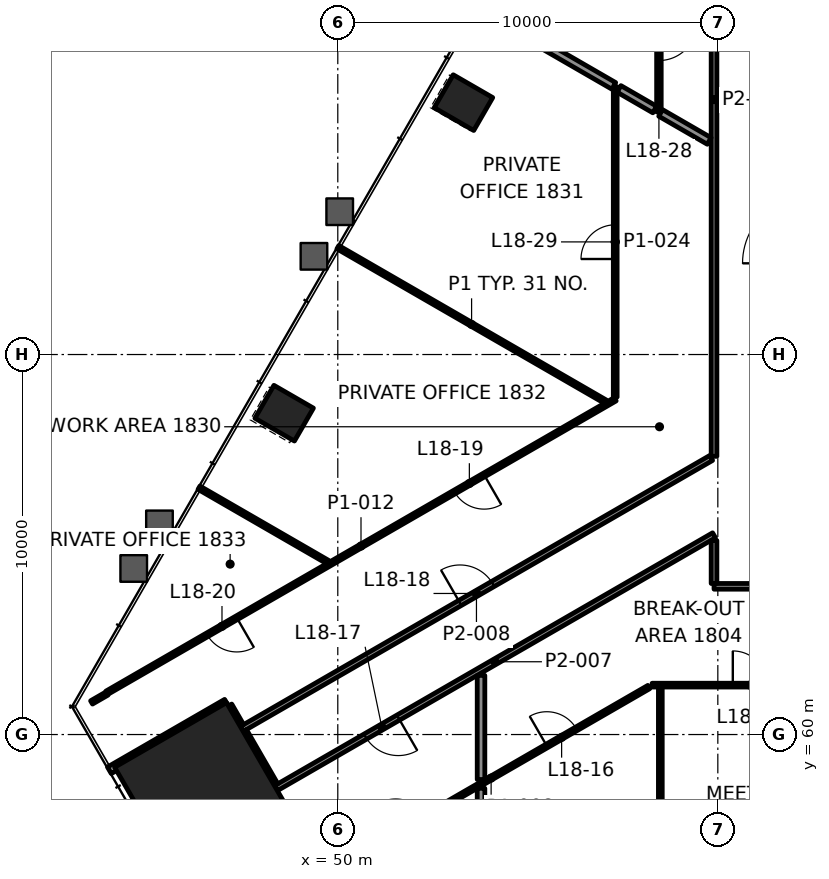
"""IFC4 building model, lengths in metres.
Left out: names, types, materials, properties, quantities, classifications, styles, units other than length and angle.
Written with IfcOpenShell. Run it as: python <this file> out.ifc"""

import sys

from ifc_helpers import new_model, si_unit, direction, frame, frame_2d, origin, origin_2d, place, context, subcontext, project, spatial, rectangle, extrude, element, fill, save


model = new_model("IFC4")
c1 = context("Model", 3, precision=1e-05, world=origin(), true_north=direction((0.0, 1.0)))
c2 = subcontext(c1, "Body", "Model", "MODEL_VIEW")
j1 = project(units=[si_unit("LENGTHUNIT", "METRE"), si_unit("PLANEANGLEUNIT", "RADIAN")], contexts=[c1])
p1 = place(None, origin())
s1 = spatial("IfcSite", under=j1, at=p1, CompositionType="ELEMENT")
p2 = place(p1, origin())
s2 = spatial("IfcBuilding", under=s1, at=p2, CompositionType="ELEMENT")
p3 = place(p2, frame((0.0, 0.0, 82.0)))
s3 = spatial("IfcBuildingStorey", under=s2, at=p3, CompositionType="ELEMENT", Elevation=82.0)
p4 = place(p3, frame((46.45, 58.517, 0.0), z_axis=(0.0, 0.0, 1.0), x_axis=(0.5, -0.866025403784, 0.0)))
e1 = element("IfcColumn", 1, at=p4, inside=s3, PredefinedType="COLUMN", context=c2, shape_type="SweptSolid", body=[
    extrude(rectangle(XDim=3.4, YDim=3.4, at=origin_2d()), origin(), (0.0, 0.0, 1.0), 4.2),
])
for number, where, z_axis, x_axis in (
    (2, (53.307, 76.628, -0.0), (0.0, 0.0, 1.0), (-0.5, -0.866, 0.0)),
    (3, (48.589, 68.457, -0.0), (0.0, 0.0, 1.0), (-0.5, -0.866, 0.0)),
):
    element("IfcColumn", number, at=place(p3, frame(where, z_axis=z_axis, x_axis=x_axis)), inside=s3, PredefinedType="COLUMN", context=c2, shape_type="SweptSolid", body=[
        extrude(rectangle(XDim=1.0, YDim=1.2, at=origin_2d()), origin(), (0.0, 0.0, 1.0), 4.2),
    ])
p5 = place(p3, frame((58.271, 61.3, 0.0), z_axis=(0.0, 0.0, 1.0), x_axis=(1.0, 0.0, 0.0)))
e4 = element("IfcWall", 4, at=p5, inside=s3, PredefinedType="PARTITIONING", context=c2, shape_type="SweptSolid", body=[
    extrude(rectangle(XDim=14.37, YDim=0.1, at=frame_2d((7.185, 0.0))), origin(), (0.0, 0.0, 1.0), 3.4),
])
p6 = place(p5, frame((2.123, 0.0, 0.0)))
e5 = element("IfcOpeningElement", 5, at=p6, cuts=e4, PredefinedType="OPENING", context=c2, shape_type="SweptSolid", body=[
    extrude(rectangle(XDim=0.9, YDim=2.1, at=frame_2d((0.45, 1.05))), frame((0.0, 0.06, 0.0), z_axis=(0.0, -1.0, 0.0), x_axis=(1.0, 0.0, 0.0)), (0.0, 0.0, 1.0), 0.12),
])
p7 = place(p5, frame((9.052, 0.0, 0.0)))
e6 = element("IfcOpeningElement", 6, at=p7, cuts=e4, PredefinedType="OPENING", context=c2, shape_type="SweptSolid", body=[
    extrude(rectangle(XDim=1.0, YDim=2.1, at=frame_2d((0.5, 1.05))), frame((0.0, 0.06, 0.0), z_axis=(0.0, -1.0, 0.0), x_axis=(1.0, 0.0, 0.0)), (0.0, 0.0, 1.0), 0.12),
])
p8 = place(p3, frame((90.1, 63.9, 0.0), z_axis=(0.0, 0.0, 1.0), x_axis=(-1.0, 0.0, 0.0)))
e7 = element("IfcWall", 7, at=p8, inside=s3, PredefinedType="PARTITIONING", context=c2, shape_type="SweptSolid", body=[
    extrude(rectangle(XDim=30.2, YDim=0.15, at=frame_2d((15.1, 0.0))), origin(), (0.0, 0.0, 1.0), 3.4),
])
p9 = place(p8, frame((4.792, 0.0, 0.0)))
e8 = element("IfcOpeningElement", 8, at=p9, cuts=e7, PredefinedType="OPENING", context=c2, shape_type="SweptSolid", body=[
    extrude(rectangle(XDim=1.0, YDim=2.1, at=frame_2d((0.5, 1.05))), frame((0.0, 0.085, 0.0), z_axis=(0.0, -1.0, 0.0), x_axis=(1.0, 0.0, 0.0)), (0.0, 0.0, 1.0), 0.17),
])
p10 = place(p8, frame((11.111, 0.0, 0.0)))
e9 = element("IfcOpeningElement", 9, at=p10, cuts=e7, PredefinedType="OPENING", context=c2, shape_type="SweptSolid", body=[
    extrude(rectangle(XDim=0.9, YDim=2.1, at=frame_2d((0.45, 1.05))), frame((0.0, 0.085, 0.0), z_axis=(0.0, -1.0, 0.0), x_axis=(1.0, 0.0, 0.0)), (0.0, 0.0, 1.0), 0.17),
])
p11 = place(p8, frame((13.47, 0.0, 0.0)))
e10 = element("IfcOpeningElement", 10, at=p11, cuts=e7, PredefinedType="OPENING", context=c2, shape_type="SweptSolid", body=[
    extrude(rectangle(XDim=0.9, YDim=2.1, at=frame_2d((0.45, 1.05))), frame((0.0, 0.085, 0.0), z_axis=(0.0, -1.0, 0.0), x_axis=(1.0, 0.0, 0.0)), (0.0, 0.0, 1.0), 0.17),
])
p12 = place(p8, frame((15.83, 0.0, 0.0)))
e11 = element("IfcOpeningElement", 11, at=p12, cuts=e7, PredefinedType="OPENING", context=c2, shape_type="SweptSolid", body=[
    extrude(rectangle(XDim=0.9, YDim=2.1, at=frame_2d((0.45, 1.05))), frame((0.0, 0.085, 0.0), z_axis=(0.0, -1.0, 0.0), x_axis=(1.0, 0.0, 0.0)), (0.0, 0.0, 1.0), 0.17),
])
p13 = place(p8, frame((21.677, 0.0, 0.0)))
e12 = element("IfcOpeningElement", 12, at=p13, cuts=e7, PredefinedType="OPENING", context=c2, shape_type="SweptSolid", body=[
    extrude(rectangle(XDim=1.0, YDim=2.1, at=frame_2d((0.5, 1.05))), frame((0.0, 0.085, 0.0), z_axis=(0.0, -1.0, 0.0), x_axis=(1.0, 0.0, 0.0)), (0.0, 0.0, 1.0), 0.17),
])
p14 = place(p8, frame((27.946, 0.0, 0.0)))
e13 = element("IfcOpeningElement", 13, at=p14, cuts=e7, PredefinedType="OPENING", context=c2, shape_type="SweptSolid", body=[
    extrude(rectangle(XDim=1.0, YDim=2.1, at=frame_2d((0.5, 1.05))), frame((0.0, 0.085, 0.0), z_axis=(0.0, -1.0, 0.0), x_axis=(1.0, 0.0, 0.0)), (0.0, 0.0, 1.0), 0.17),
])
p15 = place(p3, frame((49.885, 56.458, 0.0), z_axis=(0.0, 0.0, 1.0), x_axis=(0.866030313286, 0.499991496398, 0.0)))
e14 = element("IfcWall", 14, at=p15, inside=s3, PredefinedType="PARTITIONING", context=c2, shape_type="SweptSolid", body=[
    extrude(rectangle(XDim=9.583, YDim=0.1, at=frame_2d((4.792, 0.0))), origin(), (0.0, 0.0, 1.0), 3.4),
])
p16 = place(p15, frame((1.892, 0.0, 0.0)))
e15 = element("IfcOpeningElement", 15, at=p16, cuts=e14, PredefinedType="OPENING", context=c2, shape_type="SweptSolid", body=[
    extrude(rectangle(XDim=0.9, YDim=2.1, at=frame_2d((0.45, 1.05))), frame((0.0, 0.06, 0.0), z_axis=(0.0, -1.0, 0.0), x_axis=(1.0, 0.0, 0.0)), (0.0, 0.0, 1.0), 0.12),
])
p17 = place(p15, frame((6.484, 0.0, 0.0)))
e16 = element("IfcOpeningElement", 16, at=p17, cuts=e14, PredefinedType="OPENING", context=c2, shape_type="SweptSolid", body=[
    extrude(rectangle(XDim=0.9, YDim=2.1, at=frame_2d((0.45, 1.05))), frame((0.0, 0.06, 0.0), z_axis=(0.0, -1.0, 0.0), x_axis=(1.0, 0.0, 0.0)), (0.0, 0.0, 1.0), 0.12),
])
p18 = place(p3, frame((59.9, 65.243, 0.0), z_axis=(0.0, 0.0, 1.0), x_axis=(-0.866025527764, -0.499999785261, 0.0)))
e17 = element("IfcWall", 17, at=p18, inside=s3, PredefinedType="PARTITIONING", context=c2, shape_type="SweptSolid", body=[
    extrude(rectangle(XDim=13.31, YDim=0.15, at=frame_2d((6.655, 0.0))), origin(), (0.0, 0.0, 1.0), 3.247),
])
p19 = place(p18, frame((9.594, 0.0, 0.0)))
e18 = element("IfcOpeningElement", 18, at=p19, cuts=e17, PredefinedType="OPENING", context=c2, shape_type="SweptSolid", body=[
    extrude(rectangle(XDim=1.0, YDim=2.1, at=frame_2d((0.5, 1.05))), frame((0.0, 0.085, 0.0), z_axis=(0.0, -1.0, 0.0), x_axis=(1.0, 0.0, 0.0)), (0.0, 0.0, 1.0), 0.17),
])
p20 = place(p3, frame((47.473, 60.146, 0.0), z_axis=(0.0, 0.0, 1.0), x_axis=(0.866025677055, 0.499999526681, 0.0)))
e19 = element("IfcWall", 19, at=p20, inside=s3, PredefinedType="PARTITIONING", context=c2, shape_type="SweptSolid", body=[
    extrude(rectangle(XDim=14.263, YDim=0.15, at=frame_2d((7.132, 0.0))), origin(), (0.0, 0.0, 1.0), 3.4),
])
p21 = place(p20, frame((6.632, 0.0, 0.0)))
e20 = element("IfcOpeningElement", 20, at=p21, cuts=e19, PredefinedType="OPENING", context=c2, shape_type="SweptSolid", body=[
    extrude(rectangle(XDim=1.0, YDim=2.1, at=frame_2d((0.5, 1.05))), frame((0.0, 0.085, 0.0), z_axis=(0.0, -1.0, 0.0), x_axis=(1.0, 0.0, 0.0)), (0.0, 0.0, 1.0), 0.17),
])
p22 = place(p3, frame((43.99, 59.058, 0.0), z_axis=(0.0, 0.0, 1.0), x_axis=(0.866031398331, 0.499989616998, 0.0)))
e21 = element("IfcWall", 21, at=p22, inside=s3, PredefinedType="PARTITIONING", context=c2, shape_type="SweptSolid", body=[
    extrude(rectangle(XDim=3.56, YDim=0.2, at=frame_2d((1.78, 0.0))), origin(), (0.0, 0.0, 1.0), 3.4),
])
p23 = place(p3, frame((43.521, 60.845, 0.0), z_axis=(0.0, 0.0, 1.0), x_axis=(0.865979310119, 0.500079828073, 0.0)))
e22 = element("IfcWall", 22, at=p23, inside=s3, PredefinedType="PARTITIONING", context=c2, shape_type="SweptSolid", body=[
    extrude(rectangle(XDim=0.473, YDim=0.1, at=frame_2d((0.237, 0.0))), origin(), (0.0, 0.0, 1.0), 3.4),
])
p24 = place(p3, frame((57.3, 68.823, 0.0), z_axis=(0.0, 0.0, 1.0), x_axis=(-0.866026891502, -0.499997423189, 0.0)))
e23 = element("IfcWall", 23, at=p24, inside=s3, PredefinedType="PARTITIONING", context=c2, shape_type="SweptSolid", body=[
    extrude(rectangle(XDim=15.448, YDim=0.1, at=frame_2d((7.724, 0.0))), origin(), (0.0, 0.0, 1.0), 3.4),
])
p25 = place(p24, frame((3.982, 0.0, 0.0)))
e24 = element("IfcOpeningElement", 24, at=p25, cuts=e23, PredefinedType="OPENING", context=c2, shape_type="SweptSolid", body=[
    extrude(rectangle(XDim=0.9, YDim=2.1, at=frame_2d((0.45, 1.05))), frame((0.0, 0.06, 0.0), z_axis=(0.0, -1.0, 0.0), x_axis=(1.0, 0.0, 0.0)), (0.0, 0.0, 1.0), 0.12),
])
p26 = place(p24, frame((11.498, 0.0, 0.0)))
e25 = element("IfcOpeningElement", 25, at=p26, cuts=e23, PredefinedType="OPENING", context=c2, shape_type="SweptSolid", body=[
    extrude(rectangle(XDim=0.9, YDim=2.1, at=frame_2d((0.45, 1.05))), frame((0.0, 0.06, 0.0), z_axis=(0.0, -1.0, 0.0), x_axis=(1.0, 0.0, 0.0)), (0.0, 0.0, 1.0), 0.12),
])
p27 = place(p3, frame((59.9, 63.975, 0.0), z_axis=(0.0, 0.0, 1.0), x_axis=(0.0, 1.0, 0.0)))
e26 = element("IfcWall", 26, at=p27, inside=s3, PredefinedType="PARTITIONING", context=c2, shape_type="SweptSolid", body=[
    extrude(rectangle(XDim=1.131, YDim=0.15, at=frame_2d((0.565, 0.0))), origin(), (0.0, 0.0, 1.0), 3.247),
])
p28 = place(p3, frame((59.9, 67.321, 0.0), z_axis=(0.0, 0.0, 1.0), x_axis=(0.0, 1.0, 0.0)))
e27 = element("IfcWall", 27, at=p28, inside=s3, PredefinedType="PARTITIONING", context=c2, shape_type="SweptSolid", body=[
    extrude(rectangle(XDim=18.776, YDim=0.15, at=frame_2d((9.388, 0.0))), origin(), (0.0, 0.0, 1.0), 3.4),
])
p29 = place(p28, frame((11.711, 0.0, 0.0)))
e28 = element("IfcOpeningElement", 28, at=p29, cuts=e27, PredefinedType="OPENING", context=c2, shape_type="SweptSolid", body=[
    extrude(rectangle(XDim=1.2, YDim=2.1, at=frame_2d((0.6, 1.05))), frame((0.0, 0.085, 0.0), z_axis=(0.0, -1.0, 0.0), x_axis=(1.0, 0.0, 0.0)), (0.0, 0.0, 1.0), 0.17),
])
p30 = place(p3, frame((58.487, 54.439, 0.0), z_axis=(0.0, 0.0, 1.0), x_axis=(0.0, 1.0, 0.0)))
e29 = element("IfcWall", 29, at=p30, inside=s3, PredefinedType="PARTITIONING", context=c2, shape_type="SweptSolid", body=[
    extrude(rectangle(XDim=6.811, YDim=0.1, at=frame_2d((3.405, 0.0))), origin(), (0.0, 0.0, 1.0), 3.165),
])
p31 = place(p3, frame((58.45, 84.336, 0.0), z_axis=(0.0, 0.0, 1.0), x_axis=(0.0, -1.0, 0.0)))
e30 = element("IfcWall", 30, at=p31, inside=s3, PredefinedType="PARTITIONING", context=c2, shape_type="SweptSolid", body=[
    extrude(rectangle(XDim=7.953, YDim=0.12, at=frame_2d((3.976, 0.0))), origin(), (0.0, 0.0, 1.0), 3.4),
])
p32 = place(p31, frame((0.709, 0.0, 0.0)))
e31 = element("IfcOpeningElement", 31, at=p32, cuts=e30, PredefinedType="OPENING", context=c2, shape_type="SweptSolid", body=[
    extrude(rectangle(XDim=0.9, YDim=2.1, at=frame_2d((0.45, 1.05))), frame((0.0, 0.07, 0.0), z_axis=(0.0, -1.0, 0.0), x_axis=(1.0, 0.0, 0.0)), (0.0, 0.0, 1.0), 0.14),
])
p33 = place(p31, frame((2.833, 0.0, 0.0)))
e32 = element("IfcOpeningElement", 32, at=p33, cuts=e30, PredefinedType="OPENING", context=c2, shape_type="SweptSolid", body=[
    extrude(rectangle(XDim=0.9, YDim=2.1, at=frame_2d((0.45, 1.05))), frame((0.0, 0.07, 0.0), z_axis=(0.0, -1.0, 0.0), x_axis=(1.0, 0.0, 0.0)), (0.0, 0.0, 1.0), 0.14),
])
p34 = place(p31, frame((5.6, 0.0, 0.0)))
e33 = element("IfcOpeningElement", 33, at=p34, cuts=e30, PredefinedType="OPENING", context=c2, shape_type="SweptSolid", body=[
    extrude(rectangle(XDim=1.0, YDim=2.1, at=frame_2d((0.5, 1.05))), frame((0.0, 0.07, 0.0), z_axis=(0.0, -1.0, 0.0), x_axis=(1.0, 0.0, 0.0)), (0.0, 0.0, 1.0), 0.14),
])
p35 = place(p3, frame((57.3, 68.88, 0.0), z_axis=(0.0, 0.0, 1.0), x_axis=(0.0, 1.0, 0.0)))
e34 = element("IfcWall", 34, at=p35, inside=s3, PredefinedType="PARTITIONING", context=c2, shape_type="SweptSolid", body=[
    extrude(rectangle(XDim=8.167, YDim=0.1, at=frame_2d((4.083, 0.0))), origin(), (0.0, 0.0, 1.0), 3.4),
])
p36 = place(p35, frame((3.634, 0.0, 0.0)))
e35 = element("IfcOpeningElement", 35, at=p36, cuts=e34, PredefinedType="OPENING", context=c2, shape_type="SweptSolid", body=[
    extrude(rectangle(XDim=0.9, YDim=2.1, at=frame_2d((0.45, 1.05))), frame((0.0, 0.06, 0.0), z_axis=(0.0, -1.0, 0.0), x_axis=(1.0, 0.0, 0.0)), (0.0, 0.0, 1.0), 0.12),
])
p37 = place(p3, frame((53.769, 54.439, 0.0), z_axis=(0.0, 0.0, 1.0), x_axis=(0.0, 1.0, 0.0)))
e36 = element("IfcWall", 36, at=p37, inside=s3, PredefinedType="PARTITIONING", context=c2, shape_type="SweptSolid", body=[
    extrude(rectangle(XDim=4.146, YDim=0.2, at=frame_2d((2.073, 0.0))), origin(), (0.0, 0.0, 1.0), 3.4),
])
p38 = place(p3, frame((48.335, 58.653, 0.0), z_axis=(0.0, 0.0, 1.0), x_axis=(-0.499991515992, 0.866030301974, 0.0)))
e37 = element("IfcWall", 37, at=p38, inside=s3, PredefinedType="PARTITIONING", context=c2, shape_type="SweptSolid", body=[
    extrude(rectangle(XDim=1.649, YDim=0.2, at=frame_2d((0.825, 0.0))), origin(), (0.0, 0.0, 1.0), 3.247),
])
p39 = place(p3, frame((59.773, 75.62, 0.0), z_axis=(0.0, 0.0, 1.0), x_axis=(-0.866056109487, 0.499946812391, 0.0)))
e38 = element("IfcWall", 38, at=p39, inside=s3, PredefinedType="PARTITIONING", context=c2, shape_type="SweptSolid", body=[
    extrude(rectangle(XDim=1.476, YDim=0.2, at=frame_2d((0.738, 0.0))), origin(), (0.0, 0.0, 1.0), 3.4),
])
p40 = place(p3, frame((57.04, 68.76, 0.0), z_axis=(0.0, 0.0, 1.0), x_axis=(-0.866036506983, 0.499980768202, 0.0)))
e39 = element("IfcWall", 39, at=p40, inside=s3, PredefinedType="PARTITIONING", context=c2, shape_type="SweptSolid", body=[
    extrude(rectangle(XDim=8.127, YDim=0.1, at=frame_2d((4.063, 0.0))), origin(), (0.0, 0.0, 1.0), 3.165),
])
p41 = place(p3, frame((49.732, 64.541, 0.0), z_axis=(0.0, 0.0, 1.0), x_axis=(-0.866020177134, 0.500009052715, 0.0)))
e40 = element("IfcWall", 40, at=p41, inside=s3, PredefinedType="PARTITIONING", context=c2, shape_type="SweptSolid", body=[
    extrude(rectangle(XDim=3.908, YDim=0.1, at=frame_2d((1.954, 0.0))), origin(), (0.0, 0.0, 1.0), 3.4),
])
p42 = place(p3, frame((53.769, 58.816, 0.0), z_axis=(0.0, 0.0, 1.0), x_axis=(0.0, 1.0, 0.0)))
e41 = element("IfcWall", 41, at=p42, inside=s3, PredefinedType="PARTITIONING", context=c2, shape_type="SweptSolid", body=[
    extrude(rectangle(XDim=2.74, YDim=0.2, at=frame_2d((1.37, 0.0))), origin(), (0.0, 0.0, 1.0), 3.4),
])
p43 = place(p3, frame((47.435, 60.211, 0.0), z_axis=(0.0, 0.0, 1.0), x_axis=(-0.499801510763, 0.866139971275, 0.0)))
e42 = element("IfcWall", 42, at=p43, inside=s3, PredefinedType="PARTITIONING", context=c2, shape_type="SweptSolid", body=[
    extrude(rectangle(XDim=0.624, YDim=0.2, at=frame_2d((0.312, 0.0))), origin(), (0.0, 0.0, 1.0), 3.4),
])
p44 = place(p3, frame((58.34, 76.447, 0.0), z_axis=(0.0, 0.0, 1.0), x_axis=(-0.866062005839, 0.499936598022, 0.0)))
e43 = element("IfcWall", 43, at=p44, inside=s3, PredefinedType="PARTITIONING", context=c2, shape_type="SweptSolid", body=[
    extrude(rectangle(XDim=1.086, YDim=0.2, at=frame_2d((0.543, 0.0))), origin(), (0.0, 0.0, 1.0), 3.4),
])
p45 = place(p3, frame((57.263, 77.069, 0.0), z_axis=(0.0, 0.0, 1.0), x_axis=(-0.866048944448, 0.499959224157, 0.0)))
e44 = element("IfcWall", 44, at=p45, inside=s3, PredefinedType="PARTITIONING", context=c2, shape_type="SweptSolid", body=[
    extrude(rectangle(XDim=4.165, YDim=0.2, at=frame_2d((2.083, 0.0))), origin(), (0.0, 0.0, 1.0), 3.165),
])
p46 = place(p6, origin())
e45 = element("IfcDoor", 45, at=p46, inside=s3, OperationType="SINGLE_SWING_LEFT", PredefinedType="DOOR", context=c2, shape_type="SweptSolid", body=[
    extrude(rectangle(XDim=0.9, YDim=2.1, at=frame_2d((0.45, 1.05))), frame((0.0, 0.025, 0.0), z_axis=(0.0, -1.0, 0.0), x_axis=(1.0, 0.0, 0.0)), (0.0, 0.0, 1.0), 0.05),
])
fill(e5, e45)
p47 = place(p17, origin())
e46 = element("IfcDoor", 46, at=p47, inside=s3, OperationType="SINGLE_SWING_RIGHT", PredefinedType="DOOR", context=c2, shape_type="SweptSolid", body=[
    extrude(rectangle(XDim=0.9, YDim=2.1, at=frame_2d((0.45, 1.05))), frame((0.0, 0.025, 0.0), z_axis=(0.0, -1.0, 0.0), x_axis=(1.0, 0.0, 0.0)), (0.0, 0.0, 1.0), 0.05),
])
fill(e16, e46)
p48 = place(p19, origin())
e47 = element("IfcDoor", 47, at=p48, inside=s3, OperationType="SINGLE_SWING_RIGHT", PredefinedType="DOOR", context=c2, shape_type="SweptSolid", body=[
    extrude(rectangle(XDim=1.0, YDim=2.1, at=frame_2d((0.5, 1.05))), frame((0.0, 0.025, 0.0), z_axis=(0.0, -1.0, 0.0), x_axis=(1.0, 0.0, 0.0)), (0.0, 0.0, 1.0), 0.05),
])
fill(e18, e47)
p49 = place(p21, origin())
e48 = element("IfcDoor", 48, at=p49, inside=s3, OperationType="SINGLE_SWING_LEFT", PredefinedType="DOOR", context=c2, shape_type="SweptSolid", body=[
    extrude(rectangle(XDim=1.0, YDim=2.1, at=frame_2d((0.5, 1.05))), frame((0.0, 0.025, 0.0), z_axis=(0.0, -1.0, 0.0), x_axis=(1.0, 0.0, 0.0)), (0.0, 0.0, 1.0), 0.05),
])
fill(e20, e48)
p50 = place(p25, origin())
e49 = element("IfcDoor", 49, at=p50, inside=s3, OperationType="SINGLE_SWING_RIGHT", PredefinedType="DOOR", context=c2, shape_type="SweptSolid", body=[
    extrude(rectangle(XDim=0.9, YDim=2.1, at=frame_2d((0.45, 1.05))), frame((0.0, 0.025, 0.0), z_axis=(0.0, -1.0, 0.0), x_axis=(1.0, 0.0, 0.0)), (0.0, 0.0, 1.0), 0.05),
])
fill(e24, e49)
p51 = place(p26, origin())
e50 = element("IfcDoor", 50, at=p51, inside=s3, OperationType="SINGLE_SWING_LEFT", PredefinedType="DOOR", context=c2, shape_type="SweptSolid", body=[
    extrude(rectangle(XDim=0.9, YDim=2.1, at=frame_2d((0.45, 1.05))), frame((0.0, 0.025, 0.0), z_axis=(0.0, -1.0, 0.0), x_axis=(1.0, 0.0, 0.0)), (0.0, 0.0, 1.0), 0.05),
])
fill(e25, e50)
p52 = place(p34, origin())
e51 = element("IfcDoor", 51, at=p52, inside=s3, OperationType="SINGLE_SWING_LEFT", PredefinedType="DOOR", context=c2, shape_type="SweptSolid", body=[
    extrude(rectangle(XDim=1.0, YDim=2.1, at=frame_2d((0.5, 1.05))), frame((0.0, 0.025, 0.0), z_axis=(0.0, -1.0, 0.0), x_axis=(1.0, 0.0, 0.0)), (0.0, 0.0, 1.0), 0.05),
])
fill(e33, e51)
p53 = place(p36, origin())
e52 = element("IfcDoor", 52, at=p53, inside=s3, OperationType="SINGLE_SWING_RIGHT", PredefinedType="DOOR", context=c2, shape_type="SweptSolid", body=[
    extrude(rectangle(XDim=0.9, YDim=2.1, at=frame_2d((0.45, 1.05))), frame((0.0, 0.025, 0.0), z_axis=(0.0, -1.0, 0.0), x_axis=(1.0, 0.0, 0.0)), (0.0, 0.0, 1.0), 0.05),
])
fill(e35, e52)
save(model, sys.argv[1])
